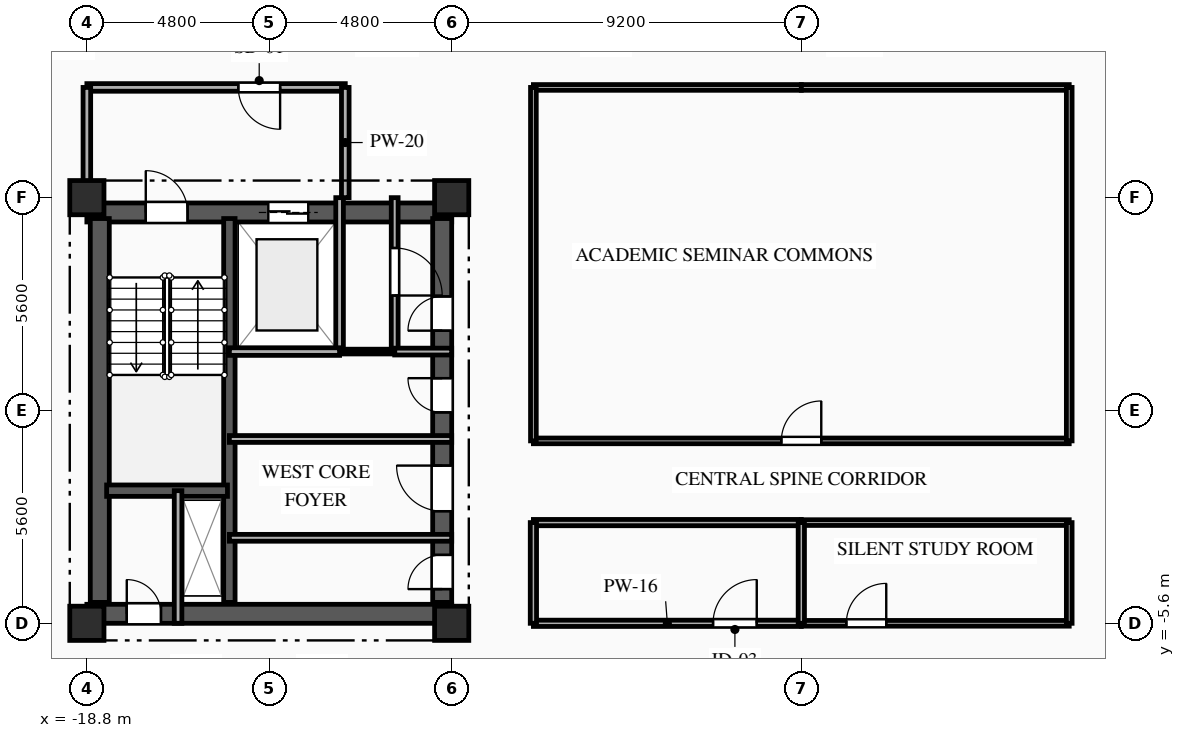
"""IFC4 building model, lengths in metres.
Left out: names, types, materials, properties, quantities, classifications, styles, units other than length and angle.
Written with IfcOpenShell. Run it as: python <this file> out.ifc"""

import sys

from ifc_helpers import new_model, si_unit, direction, frame, frame_2d, origin, origin_2d, place, context, subcontext, project, spatial, rectangle, extrude, element, fill, save


model = new_model("IFC4")
c1 = context("Model", 3, precision=1e-05, world=origin(), true_north=direction((0.0, 1.0)))
c2 = subcontext(c1, "Body", "Model", "MODEL_VIEW")
j1 = project(units=[si_unit("LENGTHUNIT", "METRE"), si_unit("PLANEANGLEUNIT", "RADIAN")], contexts=[c1])
p1 = place(None, origin())
s1 = spatial("IfcSite", under=j1, at=p1, CompositionType="ELEMENT")
p2 = place(p1, origin())
s2 = spatial("IfcBuilding", under=s1, at=p2, CompositionType="ELEMENT")
p3 = place(p2, frame((0.0, 0.0, 171.2)))
s3 = spatial("IfcBuildingStorey", under=s2, at=p3, CompositionType="ELEMENT", Elevation=171.2)
for number, where, z_axis, x_axis in (
    (1, (-18.8, -5.6, 0.0), (0.0, 0.0, 1.0), (1.0, 0.0, 0.0)),
    (2, (-18.8, 5.6, 0.0), (0.0, 0.0, 1.0), (1.0, 0.0, 0.0)),
    (3, (-9.2, -5.6, 0.0), (0.0, 0.0, 1.0), (1.0, 0.0, 0.0)),
    (4, (-9.2, 5.6, 0.0), (0.0, 0.0, 1.0), (1.0, 0.0, 0.0)),
):
    element("IfcColumn", number, at=place(p3, frame(where, z_axis=z_axis, x_axis=x_axis)), inside=s3, PredefinedType="COLUMN", context=c2, shape_type="SweptSolid", body=[
        extrude(rectangle(XDim=0.9, YDim=0.9, at=origin_2d()), origin(), (0.0, 0.0, 1.0), 3.35),
    ])
p4 = place(p3, frame((-18.8, 5.21, 0.0), z_axis=(0.0, 0.0, 1.0), x_axis=(1.0, 0.0, 0.0)))
e5 = element("IfcWall", 5, at=p4, inside=s3, PredefinedType="SHEAR", context=c2, shape_type="SweptSolid", body=[
    extrude(rectangle(XDim=9.6, YDim=0.5, at=frame_2d((4.8, 0.0))), origin(), (0.0, 0.0, 1.0), 3.0),
])
p5 = place(p4, frame((1.55, 0.0, 0.0)))
e6 = element("IfcOpeningElement", 6, at=p5, cuts=e5, PredefinedType="OPENING", context=c2, shape_type="SweptSolid", body=[
    extrude(rectangle(XDim=1.1, YDim=2.15, at=frame_2d((0.55, 1.075))), frame((0.0, 0.26, 0.0), z_axis=(0.0, -1.0, 0.0), x_axis=(1.0, 0.0, 0.0)), (0.0, 0.0, 1.0), 0.52),
])
p6 = place(p4, frame((4.775, 0.0, 0.0)))
e7 = element("IfcOpeningElement", 7, at=p6, cuts=e5, PredefinedType="OPENING", context=c2, shape_type="SweptSolid", body=[
    extrude(rectangle(XDim=1.05, YDim=2.1, at=frame_2d((0.525, 1.05))), frame((0.0, 0.26, 0.0), z_axis=(0.0, -1.0, 0.0), x_axis=(1.0, 0.0, 0.0)), (0.0, 0.0, 1.0), 0.52),
])
p7 = place(p3, frame((-18.8, -5.35, 0.0), z_axis=(0.0, 0.0, 1.0), x_axis=(1.0, 0.0, 0.0)))
e8 = element("IfcWall", 8, at=p7, inside=s3, PredefinedType="SHEAR", context=c2, shape_type="SweptSolid", body=[
    extrude(rectangle(XDim=9.6, YDim=0.5, at=frame_2d((4.8, 0.0))), origin(), (0.0, 0.0, 1.0), 3.0),
])
p8 = place(p7, frame((1.05, 0.0, 0.0)))
e9 = element("IfcOpeningElement", 9, at=p8, cuts=e8, PredefinedType="OPENING", context=c2, shape_type="SweptSolid", body=[
    extrude(rectangle(XDim=0.9, YDim=2.1, at=frame_2d((0.45, 1.05))), frame((0.0, 0.26, 0.0), z_axis=(0.0, -1.0, 0.0), x_axis=(1.0, 0.0, 0.0)), (0.0, 0.0, 1.0), 0.52),
])
p9 = place(p3, frame((-18.46, -5.05, 0.0), z_axis=(0.0, 0.0, 1.0), x_axis=(0.0, 1.0, 0.0)))
e10 = element("IfcWall", 10, at=p9, inside=s3, PredefinedType="SHEAR", context=c2, shape_type="SweptSolid", body=[
    extrude(rectangle(XDim=10.1, YDim=0.5, at=frame_2d((5.05, 0.0))), origin(), (0.0, 0.0, 1.0), 3.0),
])
p10 = place(p3, frame((-9.45, -5.05, 0.0), z_axis=(0.0, 0.0, 1.0), x_axis=(0.0, 1.0, 0.0)))
e11 = element("IfcWall", 11, at=p10, inside=s3, PredefinedType="SHEAR", context=c2, shape_type="SweptSolid", body=[
    extrude(rectangle(XDim=10.1, YDim=0.5, at=frame_2d((5.05, 0.0))), origin(), (0.0, 0.0, 1.0), 3.0),
])
p11 = place(p10, frame((7.15, 0.0, 0.0)))
e12 = element("IfcOpeningElement", 12, at=p11, cuts=e11, PredefinedType="OPENING", context=c2, shape_type="SweptSolid", body=[
    extrude(rectangle(XDim=0.9, YDim=2.1, at=frame_2d((0.45, 1.05))), frame((0.0, 0.26, 0.0), z_axis=(0.0, -1.0, 0.0), x_axis=(1.0, 0.0, 0.0)), (0.0, 0.0, 1.0), 0.52),
])
p12 = place(p10, frame((2.4, 0.0, 0.0)))
e13 = element("IfcOpeningElement", 13, at=p12, cuts=e11, PredefinedType="OPENING", context=c2, shape_type="SweptSolid", body=[
    extrude(rectangle(XDim=1.2, YDim=2.15, at=frame_2d((0.6, 1.075))), frame((0.0, 0.26, 0.0), z_axis=(0.0, -1.0, 0.0), x_axis=(1.0, 0.0, 0.0)), (0.0, 0.0, 1.0), 0.52),
])
p13 = place(p10, frame((0.35, 0.0, 0.0)))
e14 = element("IfcOpeningElement", 14, at=p13, cuts=e11, PredefinedType="OPENING", context=c2, shape_type="SweptSolid", body=[
    extrude(rectangle(XDim=0.9, YDim=2.1, at=frame_2d((0.45, 1.05))), frame((0.0, 0.26, 0.0), z_axis=(0.0, -1.0, 0.0), x_axis=(1.0, 0.0, 0.0)), (0.0, 0.0, 1.0), 0.52),
])
p14 = place(p10, frame((5.0, 0.0, 0.0)))
e15 = element("IfcOpeningElement", 15, at=p14, cuts=e11, PredefinedType="OPENING", context=c2, shape_type="SweptSolid", body=[
    extrude(rectangle(XDim=0.9, YDim=2.1, at=frame_2d((0.45, 1.05))), frame((0.0, 0.26, 0.0), z_axis=(0.0, -1.0, 0.0), x_axis=(1.0, 0.0, 0.0)), (0.0, 0.0, 1.0), 0.52),
])
p15 = place(p3, frame((-15.05, -5.05, 0.0), z_axis=(0.0, 0.0, 1.0), x_axis=(0.0, 1.0, 0.0)))
e16 = element("IfcWall", 16, at=p15, inside=s3, PredefinedType="SHEAR", context=c2, shape_type="SweptSolid", body=[
    extrude(rectangle(XDim=10.1, YDim=0.3, at=frame_2d((5.05, 0.0))), origin(), (0.0, 0.0, 1.0), 3.0),
])
p16 = place(p3, frame((-18.28, -2.11, 0.0), z_axis=(0.0, 0.0, 1.0), x_axis=(1.0, 0.0, 0.0)))
e17 = element("IfcWall", 17, at=p16, inside=s3, PredefinedType="SHEAR", context=c2, shape_type="SweptSolid", body=[
    extrude(rectangle(XDim=3.18, YDim=0.3, at=frame_2d((1.59, 0.0))), origin(), (0.0, 0.0, 1.0), 3.0),
])
p17 = place(p3, frame((-16.4, -5.6, 0.0), z_axis=(0.0, 0.0, 1.0), x_axis=(0.0, 1.0, 0.0)))
e18 = element("IfcWall", 18, at=p17, inside=s3, PredefinedType="PARTITIONING", context=c2, shape_type="SweptSolid", body=[
    extrude(rectangle(XDim=3.49, YDim=0.2, at=frame_2d((1.745, 0.0))), origin(), (0.0, 0.0, 1.0), 3.0),
])
p18 = place(p3, frame((-12.15, 1.55, 0.0), z_axis=(0.0, 0.0, 1.0), x_axis=(0.0, 1.0, 0.0)))
e19 = element("IfcWall", 19, at=p18, inside=s3, PredefinedType="PARTITIONING", context=c2, shape_type="SweptSolid", body=[
    extrude(rectangle(XDim=4.05, YDim=0.2, at=frame_2d((2.025, 0.0))), origin(), (0.0, 0.0, 1.0), 3.0),
])
p19 = place(p3, frame((-12.0, 8.5, 0.0), z_axis=(0.0, 0.0, 1.0), x_axis=(-1.0, 0.0, 0.0)))
e20 = element("IfcWall", 20, at=p19, inside=s3, PredefinedType="PARTITIONING", context=c2, shape_type="SweptSolid", body=[
    extrude(rectangle(XDim=6.8, YDim=0.2, at=frame_2d((3.4, 0.0))), origin(), (0.0, 0.0, 1.0), 3.0),
])
p20 = place(p19, frame((1.715, 0.0, 0.0)))
e21 = element("IfcOpeningElement", 21, at=p20, cuts=e20, PredefinedType="OPENING", context=c2, shape_type="SweptSolid", body=[
    extrude(rectangle(XDim=1.1, YDim=2.15, at=frame_2d((0.55, 1.075))), frame((0.0, 0.11, 0.0), z_axis=(0.0, -1.0, 0.0), x_axis=(1.0, 0.0, 0.0)), (0.0, 0.0, 1.0), 0.22),
])
p21 = place(p3, frame((-18.8, 8.5, 0.0), z_axis=(0.0, 0.0, 1.0), x_axis=(0.0, -1.0, 0.0)))
e22 = element("IfcWall", 22, at=p21, inside=s3, PredefinedType="PARTITIONING", context=c2, shape_type="SweptSolid", body=[
    extrude(rectangle(XDim=2.9, YDim=0.2, at=frame_2d((1.45, 0.0))), origin(), (0.0, 0.0, 1.0), 2.485),
])
p22 = place(p3, frame((-12.0, 5.6, 0.0), z_axis=(0.0, 0.0, 1.0), x_axis=(0.0, 1.0, 0.0)))
e23 = element("IfcWall", 23, at=p22, inside=s3, PredefinedType="PARTITIONING", context=c2, shape_type="SweptSolid", body=[
    extrude(rectangle(XDim=2.9, YDim=0.2, at=frame_2d((1.45, 0.0))), origin(), (0.0, 0.0, 1.0), 3.0),
])
p23 = place(p3, frame((-10.7, 5.6, 0.0), z_axis=(0.0, 0.0, 1.0), x_axis=(0.0, -1.0, 0.0)))
e24 = element("IfcWall", 24, at=p23, inside=s3, PredefinedType="PARTITIONING", context=c2, shape_type="SweptSolid", body=[
    extrude(rectangle(XDim=4.05, YDim=0.18, at=frame_2d((2.025, 0.0))), origin(), (0.0, 0.0, 1.0), 3.0),
])
p24 = place(p23, frame((1.325, 0.0, 0.0)))
e25 = element("IfcOpeningElement", 25, at=p24, cuts=e24, PredefinedType="OPENING", context=c2, shape_type="SweptSolid", body=[
    extrude(rectangle(XDim=1.25, YDim=2.2, at=frame_2d((0.625, 1.1))), frame((0.0, 0.1, 0.0), z_axis=(0.0, -1.0, 0.0), x_axis=(1.0, 0.0, 0.0)), (0.0, 0.0, 1.0), 0.2),
])
p25 = place(p3, frame((-10.7, 1.55, 0.0), z_axis=(0.0, 0.0, 1.0), x_axis=(1.0, 0.0, 0.0)))
e26 = element("IfcWall", 26, at=p25, inside=s3, PredefinedType="PARTITIONING", context=c2, shape_type="SweptSolid", body=[
    extrude(rectangle(XDim=1.5, YDim=0.18, at=frame_2d((0.75, 0.0))), origin(), (0.0, 0.0, 1.0), 3.0),
])
p26 = place(p3, frame((-12.15, 1.55, 0.0), z_axis=(0.0, 0.0, 1.0), x_axis=(1.0, 0.0, 0.0)))
e27 = element("IfcWall", 27, at=p26, inside=s3, PredefinedType="PARTITIONING", context=c2, shape_type="SweptSolid", body=[
    extrude(rectangle(XDim=1.45, YDim=0.125, at=frame_2d((0.725, 0.0))), origin(), (0.0, 0.0, 1.0), 3.0),
])
p27 = place(p3, frame((-15.05, -3.35, 0.0), z_axis=(0.0, 0.0, 1.0), x_axis=(1.0, 0.0, 0.0)))
e28 = element("IfcWall", 28, at=p27, inside=s3, PredefinedType="PARTITIONING", context=c2, shape_type="SweptSolid", body=[
    extrude(rectangle(XDim=5.85, YDim=0.18, at=frame_2d((2.925, 0.0))), origin(), (0.0, 0.0, 1.0), 2.715),
])
p28 = place(p3, frame((-9.2, -0.75, 0.0), z_axis=(0.0, 0.0, 1.0), x_axis=(-1.0, 0.0, 0.0)))
e29 = element("IfcWall", 29, at=p28, inside=s3, PredefinedType="PARTITIONING", context=c2, shape_type="SweptSolid", body=[
    extrude(rectangle(XDim=5.85, YDim=0.18, at=frame_2d((2.925, 0.0))), origin(), (0.0, 0.0, 1.0), 3.0),
])
for number, where, z_axis, x_axis in (
    (30, (0.0, 8.5, 0.0), (0.0, 0.0, 1.0), (-1.0, 0.0, 0.0)),
    (31, (7.05, 8.5, 0.0), (0.0, 0.0, 1.0), (-1.0, 0.0, 0.0)),
):
    element("IfcWall", number, at=place(p3, frame(where, z_axis=z_axis, x_axis=x_axis)), inside=s3, PredefinedType="PARTITIONING", context=c2, shape_type="SweptSolid", body=[
        extrude(rectangle(XDim=7.05, YDim=0.15, at=frame_2d((3.525, 0.0))), origin(), (0.0, 0.0, 1.0), 3.0),
    ])
p29 = place(p3, frame((-7.05, -5.6, 0.0), z_axis=(0.0, 0.0, 1.0), x_axis=(1.0, 0.0, 0.0)))
e32 = element("IfcWall", 32, at=p29, inside=s3, PredefinedType="PARTITIONING", context=c2, shape_type="SweptSolid", body=[
    extrude(rectangle(XDim=7.05, YDim=0.165, at=frame_2d((3.525, 0.0))), origin(), (0.0, 0.0, 1.0), 2.485),
])
p30 = place(p29, frame((4.728, 0.0, 0.0)))
e33 = element("IfcOpeningElement", 33, at=p30, cuts=e32, PredefinedType="OPENING", context=c2, shape_type="SweptSolid", body=[
    extrude(rectangle(XDim=1.15, YDim=2.15, at=frame_2d((0.575, 1.075))), frame((0.0, 0.093, 0.0), z_axis=(0.0, -1.0, 0.0), x_axis=(1.0, 0.0, 0.0)), (0.0, 0.0, 1.0), 0.185),
])
p31 = place(p3, frame((0.0, -5.6, 0.0), z_axis=(0.0, 0.0, 1.0), x_axis=(1.0, 0.0, 0.0)))
e34 = element("IfcWall", 34, at=p31, inside=s3, PredefinedType="PARTITIONING", context=c2, shape_type="SweptSolid", body=[
    extrude(rectangle(XDim=7.05, YDim=0.15, at=frame_2d((3.525, 0.0))), origin(), (0.0, 0.0, 1.0), 2.485),
])
p32 = place(p31, frame((1.185, 0.0, 0.0)))
e35 = element("IfcOpeningElement", 35, at=p32, cuts=e34, PredefinedType="OPENING", context=c2, shape_type="SweptSolid", body=[
    extrude(rectangle(XDim=1.05, YDim=2.15, at=frame_2d((0.525, 1.075))), frame((0.0, 0.085, 0.0), z_axis=(0.0, -1.0, 0.0), x_axis=(1.0, 0.0, 0.0)), (0.0, 0.0, 1.0), 0.17),
])
p33 = place(p3, frame((-7.05, -0.8, 0.0), z_axis=(0.0, 0.0, 1.0), x_axis=(1.0, 0.0, 0.0)))
e36 = element("IfcWall", 36, at=p33, inside=s3, PredefinedType="PARTITIONING", context=c2, shape_type="SweptSolid", body=[
    extrude(rectangle(XDim=14.1, YDim=0.15, at=frame_2d((7.05, 0.0))), origin(), (0.0, 0.0, 1.0), 3.0),
])
p34 = place(p33, frame((6.525, 0.0, 0.0)))
e37 = element("IfcOpeningElement", 37, at=p34, cuts=e36, PredefinedType="OPENING", context=c2, shape_type="SweptSolid", body=[
    extrude(rectangle(XDim=1.05, YDim=2.15, at=frame_2d((0.525, 1.075))), frame((0.0, 0.085, 0.0), z_axis=(0.0, -1.0, 0.0), x_axis=(1.0, 0.0, 0.0)), (0.0, 0.0, 1.0), 0.17),
])
p35 = place(p3, frame((0.0, -2.95, 0.0), z_axis=(0.0, 0.0, 1.0), x_axis=(-1.0, 0.0, 0.0)))
e38 = element("IfcWall", 38, at=p35, inside=s3, PredefinedType="PARTITIONING", context=c2, shape_type="SweptSolid", body=[
    extrude(rectangle(XDim=7.05, YDim=0.165, at=frame_2d((3.525, 0.0))), origin(), (0.0, 0.0, 1.0), 3.0),
])
p36 = place(p3, frame((7.05, -2.95, 0.0), z_axis=(0.0, 0.0, 1.0), x_axis=(-1.0, 0.0, 0.0)))
e39 = element("IfcWall", 39, at=p36, inside=s3, PredefinedType="PARTITIONING", context=c2, shape_type="SweptSolid", body=[
    extrude(rectangle(XDim=7.05, YDim=0.15, at=frame_2d((3.525, 0.0))), origin(), (0.0, 0.0, 1.0), 3.0),
])
p37 = place(p3, frame((-7.05, 8.5, 0.0), z_axis=(0.0, 0.0, 1.0), x_axis=(0.0, -1.0, 0.0)))
e40 = element("IfcWall", 40, at=p37, inside=s3, PredefinedType="PARTITIONING", context=c2, shape_type="SweptSolid", body=[
    extrude(rectangle(XDim=9.3, YDim=0.15, at=frame_2d((4.65, 0.0))), origin(), (0.0, 0.0, 1.0), 3.0),
])
p38 = place(p3, frame((-7.05, -2.95, 0.0), z_axis=(0.0, 0.0, 1.0), x_axis=(0.0, -1.0, 0.0)))
e41 = element("IfcWall", 41, at=p38, inside=s3, PredefinedType="PARTITIONING", context=c2, shape_type="SweptSolid", body=[
    extrude(rectangle(XDim=2.65, YDim=0.165, at=frame_2d((1.325, 0.0))), origin(), (0.0, 0.0, 1.0), 3.0),
])
p39 = place(p3, frame((7.05, -0.8, 0.0), z_axis=(0.0, 0.0, 1.0), x_axis=(0.0, 1.0, 0.0)))
e42 = element("IfcWall", 42, at=p39, inside=s3, PredefinedType="PARTITIONING", context=c2, shape_type="SweptSolid", body=[
    extrude(rectangle(XDim=9.3, YDim=0.15, at=frame_2d((4.65, 0.0))), origin(), (0.0, 0.0, 1.0), 3.0),
])
p40 = place(p3, frame((7.05, -5.6, 0.0), z_axis=(0.0, 0.0, 1.0), x_axis=(0.0, 1.0, 0.0)))
e43 = element("IfcWall", 43, at=p40, inside=s3, PredefinedType="PARTITIONING", context=c2, shape_type="SweptSolid", body=[
    extrude(rectangle(XDim=2.65, YDim=0.15, at=frame_2d((1.325, 0.0))), origin(), (0.0, 0.0, 1.0), 3.0),
])
p41 = place(p3, frame((0.0, -2.95, 0.0), z_axis=(0.0, 0.0, 1.0), x_axis=(0.0, -1.0, 0.0)))
e44 = element("IfcWall", 44, at=p41, inside=s3, PredefinedType="PARTITIONING", context=c2, shape_type="SweptSolid", body=[
    extrude(rectangle(XDim=2.65, YDim=0.165, at=frame_2d((1.325, 0.0))), origin(), (0.0, 0.0, 1.0), 3.0),
])
p42 = place(p3, frame((-15.05, 1.55, 0.0), z_axis=(0.0, 0.0, 1.0), x_axis=(1.0, 0.0, 0.0)))
e45 = element("IfcWall", 45, at=p42, inside=s3, PredefinedType="PARTITIONING", context=c2, shape_type="SweptSolid", body=[
    extrude(rectangle(XDim=2.9, YDim=0.2, at=frame_2d((1.45, 0.0))), origin(), (0.0, 0.0, 1.0), 3.0),
])
p43 = place(p5, origin())
e46 = element("IfcDoor", 46, at=p43, inside=s3, OperationType="SINGLE_SWING_LEFT", PredefinedType="DOOR", context=c2, shape_type="SweptSolid", body=[
    extrude(rectangle(XDim=1.1, YDim=2.15, at=frame_2d((0.55, 1.075))), frame((0.0, 0.025, 0.0), z_axis=(0.0, -1.0, 0.0), x_axis=(1.0, 0.0, 0.0)), (0.0, 0.0, 1.0), 0.05),
])
fill(e6, e46)
p44 = place(p6, origin())
e47 = element("IfcDoor", 47, at=p44, inside=s3, OperationType="DOUBLE_DOOR_SLIDING", PredefinedType="DOOR", context=c2, shape_type="SweptSolid", body=[
    extrude(rectangle(XDim=1.05, YDim=2.1, at=frame_2d((0.525, 1.05))), frame((0.0, 0.025, 0.0), z_axis=(0.0, -1.0, 0.0), x_axis=(1.0, 0.0, 0.0)), (0.0, 0.0, 1.0), 0.05),
])
fill(e7, e47)
p45 = place(p8, origin())
e48 = element("IfcDoor", 48, at=p45, inside=s3, OperationType="SINGLE_SWING_LEFT", PredefinedType="DOOR", context=c2, shape_type="SweptSolid", body=[
    extrude(rectangle(XDim=0.9, YDim=2.1, at=frame_2d((0.45, 1.05))), frame((0.0, 0.025, 0.0), z_axis=(0.0, -1.0, 0.0), x_axis=(1.0, 0.0, 0.0)), (0.0, 0.0, 1.0), 0.05),
])
fill(e9, e48)
p46 = place(p20, origin())
e49 = element("IfcDoor", 49, at=p46, inside=s3, OperationType="SINGLE_SWING_LEFT", PredefinedType="DOOR", context=c2, shape_type="SweptSolid", body=[
    extrude(rectangle(XDim=1.1, YDim=2.15, at=frame_2d((0.55, 1.075))), frame((0.0, 0.025, 0.0), z_axis=(0.0, -1.0, 0.0), x_axis=(1.0, 0.0, 0.0)), (0.0, 0.0, 1.0), 0.05),
])
fill(e21, e49)
p47 = place(p24, origin())
e50 = element("IfcDoor", 50, at=p47, inside=s3, OperationType="SINGLE_SWING_RIGHT", PredefinedType="DOOR", context=c2, shape_type="SweptSolid", body=[
    extrude(rectangle(XDim=1.25, YDim=2.2, at=frame_2d((0.625, 1.1))), frame((0.0, 0.025, 0.0), z_axis=(0.0, -1.0, 0.0), x_axis=(1.0, 0.0, 0.0)), (0.0, 0.0, 1.0), 0.05),
])
fill(e25, e50)
p48 = place(p11, origin())
e51 = element("IfcDoor", 51, at=p48, inside=s3, OperationType="SINGLE_SWING_LEFT", PredefinedType="DOOR", context=c2, shape_type="SweptSolid", body=[
    extrude(rectangle(XDim=0.9, YDim=2.1, at=frame_2d((0.45, 1.05))), frame((0.0, 0.025, 0.0), z_axis=(0.0, -1.0, 0.0), x_axis=(1.0, 0.0, 0.0)), (0.0, 0.0, 1.0), 0.05),
])
fill(e12, e51)
p49 = place(p12, origin())
e52 = element("IfcDoor", 52, at=p49, inside=s3, OperationType="SINGLE_SWING_RIGHT", PredefinedType="DOOR", context=c2, shape_type="SweptSolid", body=[
    extrude(rectangle(XDim=1.2, YDim=2.15, at=frame_2d((0.6, 1.075))), frame((0.0, 0.025, 0.0), z_axis=(0.0, -1.0, 0.0), x_axis=(1.0, 0.0, 0.0)), (0.0, 0.0, 1.0), 0.05),
])
fill(e13, e52)
p50 = place(p13, origin())
e53 = element("IfcDoor", 53, at=p50, inside=s3, OperationType="SINGLE_SWING_LEFT", PredefinedType="DOOR", context=c2, shape_type="SweptSolid", body=[
    extrude(rectangle(XDim=0.9, YDim=2.1, at=frame_2d((0.45, 1.05))), frame((0.0, 0.025, 0.0), z_axis=(0.0, -1.0, 0.0), x_axis=(1.0, 0.0, 0.0)), (0.0, 0.0, 1.0), 0.05),
])
fill(e14, e53)
p51 = place(p14, origin())
e54 = element("IfcDoor", 54, at=p51, inside=s3, OperationType="SINGLE_SWING_RIGHT", PredefinedType="DOOR", context=c2, shape_type="SweptSolid", body=[
    extrude(rectangle(XDim=0.9, YDim=2.1, at=frame_2d((0.45, 1.05))), frame((0.0, 0.025, 0.0), z_axis=(0.0, -1.0, 0.0), x_axis=(1.0, 0.0, 0.0)), (0.0, 0.0, 1.0), 0.05),
])
fill(e15, e54)
p52 = place(p30, origin())
e55 = element("IfcDoor", 55, at=p52, inside=s3, OperationType="SINGLE_SWING_RIGHT", PredefinedType="DOOR", context=c2, shape_type="SweptSolid", body=[
    extrude(rectangle(XDim=1.15, YDim=2.15, at=frame_2d((0.575, 1.075))), frame((0.0, 0.025, 0.0), z_axis=(0.0, -1.0, 0.0), x_axis=(1.0, 0.0, 0.0)), (0.0, 0.0, 1.0), 0.05),
])
fill(e33, e55)
p53 = place(p32, origin())
e56 = element("IfcDoor", 56, at=p53, inside=s3, OperationType="SINGLE_SWING_RIGHT", PredefinedType="DOOR", context=c2, shape_type="SweptSolid", body=[
    extrude(rectangle(XDim=1.05, YDim=2.15, at=frame_2d((0.525, 1.075))), frame((0.0, 0.025, 0.0), z_axis=(0.0, -1.0, 0.0), x_axis=(1.0, 0.0, 0.0)), (0.0, 0.0, 1.0), 0.05),
])
fill(e35, e56)
p54 = place(p34, origin())
e57 = element("IfcDoor", 57, at=p54, inside=s3, OperationType="SINGLE_SWING_RIGHT", PredefinedType="DOOR", context=c2, shape_type="SweptSolid", body=[
    extrude(rectangle(XDim=1.05, YDim=2.15, at=frame_2d((0.525, 1.075))), frame((0.0, 0.025, 0.0), z_axis=(0.0, -1.0, 0.0), x_axis=(1.0, 0.0, 0.0)), (0.0, 0.0, 1.0), 0.05),
])
fill(e37, e57)
save(model, sys.argv[1])
